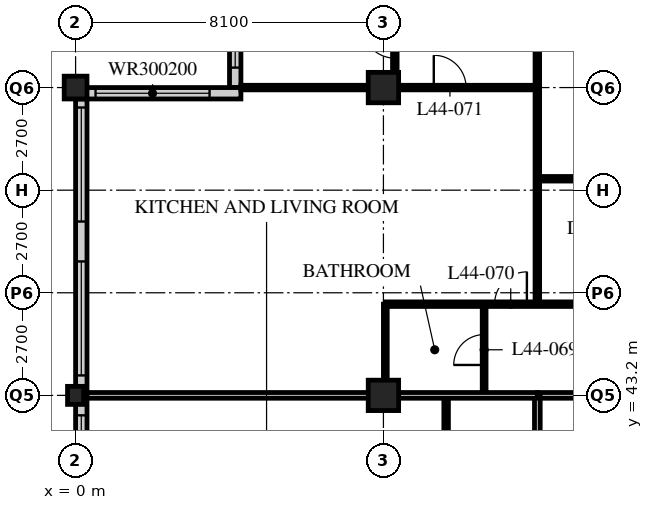
"""IFC4 building model, lengths in metres.
Left out: names, types, materials, properties, quantities, classifications, styles, units other than length and angle.
Written with IfcOpenShell. Run it as: python <this file> out.ifc"""

import sys

from ifc_helpers import new_model, si_unit, direction, frame, frame_2d, origin, origin_2d, place, context, subcontext, project, spatial, rectangle, hollow_rectangle, i_section, extrude, element, fill, save


model = new_model("IFC4")
c1 = context("Model", 3, precision=1e-05, world=origin(), true_north=direction((0.0, 1.0)))
c2 = subcontext(c1, "Body", "Model", "MODEL_VIEW")
j1 = project(units=[si_unit("LENGTHUNIT", "METRE"), si_unit("PLANEANGLEUNIT", "RADIAN")], contexts=[c1])
p1 = place(None, origin())
s1 = spatial("IfcSite", under=j1, at=p1, CompositionType="ELEMENT")
p2 = place(p1, origin())
s2 = spatial("IfcBuilding", under=s1, at=p2, CompositionType="ELEMENT")
p3 = place(p2, frame((0.0, 0.0, 174.0)))
s3 = spatial("IfcBuildingStorey", under=s2, at=p3, CompositionType="ELEMENT", Elevation=174.0)
p4 = place(p3, frame((0.0, 43.2, 0.0), z_axis=(0.0, 0.0, 1.0), x_axis=(1.0, 0.0, 0.0)))
e1 = element("IfcColumn", 1, at=p4, inside=s3, PredefinedType="COLUMN", context=c2, shape_type="SweptSolid", body=[
    extrude(i_section(OverallWidth=0.424, OverallDepth=0.475, WebThickness=0.048, FlangeThickness=0.077, FilletRadius=0.015, at=origin_2d()), origin(), (0.0, 0.0, 1.0), 3.6),
])
p5 = place(p3, frame((0.0, 51.3, 0.0), z_axis=(0.0, 0.0, 1.0), x_axis=(1.0, 0.0, 0.0)))
e2 = element("IfcColumn", 2, at=p5, inside=s3, PredefinedType="COLUMN", context=c2, shape_type="SweptSolid", body=[
    extrude(hollow_rectangle(XDim=0.6, YDim=0.6, WallThickness=0.05, at=origin_2d()), origin(), (0.0, 0.0, 1.0), 3.6),
])
for number, where, z_axis, x_axis in (
    (3, (8.1, 43.2, 0.0), (0.0, 0.0, 1.0), (1.0, 0.0, 0.0)),
    (4, (8.1, 51.3, 0.0), (0.0, 0.0, 1.0), (1.0, 0.0, 0.0)),
):
    element("IfcColumn", number, at=place(p3, frame(where, z_axis=z_axis, x_axis=x_axis)), inside=s3, PredefinedType="COLUMN", context=c2, shape_type="SweptSolid", body=[
        extrude(hollow_rectangle(XDim=0.8, YDim=0.8, WallThickness=0.08, at=origin_2d()), origin(), (0.0, 0.0, 1.0), 3.6),
    ])
p6 = place(p3, frame((4.2, 55.05, 0.0), z_axis=(0.0, 0.0, 1.0), x_axis=(0.0, -1.0, 0.0)))
e5 = element("IfcWall", 5, at=p6, inside=s3, PredefinedType="SOLIDWALL", context=c2, shape_type="SweptSolid", body=[
    extrude(rectangle(XDim=3.75, YDim=0.3, at=frame_2d((1.875, 0.0))), origin(), (0.0, 0.0, 1.0), 3.39),
])
p7 = place(p6, frame((0.225, 0.0, 0.6)))
e6 = element("IfcOpeningElement", 6, at=p7, cuts=e5, PredefinedType="OPENING", context=c2, shape_type="SweptSolid", body=[
    extrude(rectangle(XDim=3.0, YDim=2.0, at=frame_2d((1.5, 1.0))), frame((0.0, 0.16, 0.0), z_axis=(0.0, -1.0, 0.0), x_axis=(1.0, 0.0, 0.0)), (0.0, 0.0, 1.0), 0.32),
])
p8 = place(p3, frame((4.35, 51.15, 0.0), z_axis=(0.0, 0.0, 1.0), x_axis=(-1.0, 0.0, 0.0)))
e7 = element("IfcWall", 7, at=p8, inside=s3, PredefinedType="SOLIDWALL", context=c2, shape_type="SweptSolid", body=[
    extrude(rectangle(XDim=4.35, YDim=0.3, at=frame_2d((2.175, 0.0))), origin(), (0.0, 0.0, 1.0), 3.39),
])
p9 = place(p8, frame((0.825, 0.0, 0.6)))
e8 = element("IfcOpeningElement", 8, at=p9, cuts=e7, PredefinedType="OPENING", context=c2, shape_type="SweptSolid", body=[
    extrude(rectangle(XDim=3.0, YDim=2.0, at=frame_2d((1.5, 1.0))), frame((0.0, 0.16, 0.0), z_axis=(0.0, -1.0, 0.0), x_axis=(1.0, 0.0, 0.0)), (0.0, 0.0, 1.0), 0.32),
])
p10 = place(p3, frame((0.15, 51.0, 0.0), z_axis=(0.0, 0.0, 1.0), x_axis=(0.0, -1.0, 0.0)))
e9 = element("IfcWall", 9, at=p10, inside=s3, PredefinedType="SOLIDWALL", context=c2, shape_type="SweptSolid", body=[
    extrude(rectangle(XDim=32.1, YDim=0.3, at=frame_2d((16.05, 0.0))), origin(), (0.0, 0.0, 1.0), 3.39),
])
p11 = place(p10, frame((0.225, 0.0, 0.6)))
e10 = element("IfcOpeningElement", 10, at=p11, cuts=e9, PredefinedType="OPENING", context=c2, shape_type="SweptSolid", body=[
    extrude(rectangle(XDim=3.0, YDim=2.4, at=frame_2d((1.5, 1.2))), frame((0.0, 0.16, 0.0), z_axis=(0.0, -1.0, 0.0), x_axis=(1.0, 0.0, 0.0)), (0.0, 0.0, 1.0), 0.32),
])
p12 = place(p10, frame((4.275, 0.0, 0.6)))
e11 = element("IfcOpeningElement", 11, at=p12, cuts=e9, PredefinedType="OPENING", context=c2, shape_type="SweptSolid", body=[
    extrude(rectangle(XDim=3.0, YDim=2.4, at=frame_2d((1.5, 1.2))), frame((0.0, 0.16, 0.0), z_axis=(0.0, -1.0, 0.0), x_axis=(1.0, 0.0, 0.0)), (0.0, 0.0, 1.0), 0.32),
])
p13 = place(p10, frame((8.325, 0.0, 0.6)))
e12 = element("IfcOpeningElement", 12, at=p13, cuts=e9, PredefinedType="OPENING", context=c2, shape_type="SweptSolid", body=[
    extrude(rectangle(XDim=3.0, YDim=2.4, at=frame_2d((1.5, 1.2))), frame((0.0, 0.16, 0.0), z_axis=(0.0, -1.0, 0.0), x_axis=(1.0, 0.0, 0.0)), (0.0, 0.0, 1.0), 0.32),
])
p14 = place(p10, frame((12.375, 0.0, 0.6)))
e13 = element("IfcOpeningElement", 13, at=p14, cuts=e9, PredefinedType="OPENING", context=c2, shape_type="SweptSolid", body=[
    extrude(rectangle(XDim=3.0, YDim=2.4, at=frame_2d((1.5, 1.2))), frame((0.0, 0.16, 0.0), z_axis=(0.0, -1.0, 0.0), x_axis=(1.0, 0.0, 0.0)), (0.0, 0.0, 1.0), 0.32),
])
p15 = place(p10, frame((16.425, 0.0, 0.6)))
e14 = element("IfcOpeningElement", 14, at=p15, cuts=e9, PredefinedType="OPENING", context=c2, shape_type="SweptSolid", body=[
    extrude(rectangle(XDim=3.0, YDim=2.4, at=frame_2d((1.5, 1.2))), frame((0.0, 0.16, 0.0), z_axis=(0.0, -1.0, 0.0), x_axis=(1.0, 0.0, 0.0)), (0.0, 0.0, 1.0), 0.32),
])
p16 = place(p10, frame((20.475, 0.0, 0.6)))
e15 = element("IfcOpeningElement", 15, at=p16, cuts=e9, PredefinedType="OPENING", context=c2, shape_type="SweptSolid", body=[
    extrude(rectangle(XDim=3.0, YDim=2.4, at=frame_2d((1.5, 1.2))), frame((0.0, 0.16, 0.0), z_axis=(0.0, -1.0, 0.0), x_axis=(1.0, 0.0, 0.0)), (0.0, 0.0, 1.0), 0.32),
])
p17 = place(p10, frame((24.525, 0.0, 0.6)))
e16 = element("IfcOpeningElement", 16, at=p17, cuts=e9, PredefinedType="OPENING", context=c2, shape_type="SweptSolid", body=[
    extrude(rectangle(XDim=3.0, YDim=2.4, at=frame_2d((1.5, 1.2))), frame((0.0, 0.16, 0.0), z_axis=(0.0, -1.0, 0.0), x_axis=(1.0, 0.0, 0.0)), (0.0, 0.0, 1.0), 0.32),
])
p18 = place(p10, frame((28.575, 0.0, 0.6)))
e17 = element("IfcOpeningElement", 17, at=p18, cuts=e9, PredefinedType="OPENING", context=c2, shape_type="SweptSolid", body=[
    extrude(rectangle(XDim=3.0, YDim=2.4, at=frame_2d((1.5, 1.2))), frame((0.0, 0.16, 0.0), z_axis=(0.0, -1.0, 0.0), x_axis=(1.0, 0.0, 0.0)), (0.0, 0.0, 1.0), 0.32),
])
p19 = place(p3, frame((12.15, 43.2, 0.0), z_axis=(0.0, 0.0, 1.0), x_axis=(1.0, 0.0, 0.0)))
e18 = element("IfcWall", 18, at=p19, inside=s3, PredefinedType="PARTITIONING", context=c2, shape_type="SweptSolid", body=[
    extrude(rectangle(XDim=32.4, YDim=0.15, at=frame_2d((16.2, 0.0))), origin(), (0.0, 0.0, 1.0), 2.778),
])
p20 = place(p19, frame((4.95, 0.0, 0.0)))
e19 = element("IfcOpeningElement", 19, at=p20, cuts=e18, PredefinedType="OPENING", context=c2, shape_type="SweptSolid", body=[
    extrude(rectangle(XDim=1.0, YDim=2.1, at=frame_2d((0.5, 1.05))), frame((0.0, 0.085, 0.0), z_axis=(0.0, -1.0, 0.0), x_axis=(1.0, 0.0, 0.0)), (0.0, 0.0, 1.0), 0.17),
])
p21 = place(p19, frame((13.05, 0.0, 0.0)))
e20 = element("IfcOpeningElement", 20, at=p21, cuts=e18, PredefinedType="OPENING", context=c2, shape_type="SweptSolid", body=[
    extrude(rectangle(XDim=1.0, YDim=2.1, at=frame_2d((0.5, 1.05))), frame((0.0, 0.085, 0.0), z_axis=(0.0, -1.0, 0.0), x_axis=(1.0, 0.0, 0.0)), (0.0, 0.0, 1.0), 0.17),
])
p22 = place(p19, frame((21.15, 0.0, 0.0)))
e21 = element("IfcOpeningElement", 21, at=p22, cuts=e18, PredefinedType="OPENING", context=c2, shape_type="SweptSolid", body=[
    extrude(rectangle(XDim=1.0, YDim=2.1, at=frame_2d((0.5, 1.05))), frame((0.0, 0.085, 0.0), z_axis=(0.0, -1.0, 0.0), x_axis=(1.0, 0.0, 0.0)), (0.0, 0.0, 1.0), 0.17),
])
p23 = place(p19, frame((29.875, 0.0, 0.0)))
e22 = element("IfcOpeningElement", 22, at=p23, cuts=e18, PredefinedType="OPENING", context=c2, shape_type="SweptSolid", body=[
    extrude(rectangle(XDim=1.0, YDim=2.1, at=frame_2d((0.5, 1.05))), frame((0.0, 0.085, 0.0), z_axis=(0.0, -1.0, 0.0), x_axis=(1.0, 0.0, 0.0)), (0.0, 0.0, 1.0), 0.17),
])
p24 = place(p19, frame((1.525, 0.0, 0.0)))
e23 = element("IfcOpeningElement", 23, at=p24, cuts=e18, PredefinedType="OPENING", context=c2, shape_type="SweptSolid", body=[
    extrude(rectangle(XDim=1.0, YDim=2.1, at=frame_2d((0.5, 1.05))), frame((0.0, 0.085, 0.0), z_axis=(0.0, -1.0, 0.0), x_axis=(1.0, 0.0, 0.0)), (0.0, 0.0, 1.0), 0.17),
])
p25 = place(p3, frame((12.15, 18.9, 0.0), z_axis=(0.0, 0.0, 1.0), x_axis=(0.0, 1.0, 0.0)))
e24 = element("IfcWall", 24, at=p25, inside=s3, PredefinedType="PARTITIONING", context=c2, shape_type="SweptSolid", body=[
    extrude(rectangle(XDim=24.3, YDim=0.15, at=frame_2d((12.15, 0.0))), origin(), (0.0, 0.0, 1.0), 3.39),
])
p26 = place(p25, frame((2.35, 0.0, 0.0)))
e25 = element("IfcOpeningElement", 25, at=p26, cuts=e24, PredefinedType="OPENING", context=c2, shape_type="SweptSolid", body=[
    extrude(rectangle(XDim=1.0, YDim=2.1, at=frame_2d((0.5, 1.05))), frame((0.0, 0.085, 0.0), z_axis=(0.0, -1.0, 0.0), x_axis=(1.0, 0.0, 0.0)), (0.0, 0.0, 1.0), 0.17),
])
p27 = place(p25, frame((6.4, 0.0, 0.0)))
e26 = element("IfcOpeningElement", 26, at=p27, cuts=e24, PredefinedType="OPENING", context=c2, shape_type="SweptSolid", body=[
    extrude(rectangle(XDim=1.0, YDim=2.1, at=frame_2d((0.5, 1.05))), frame((0.0, 0.085, 0.0), z_axis=(0.0, -1.0, 0.0), x_axis=(1.0, 0.0, 0.0)), (0.0, 0.0, 1.0), 0.17),
])
p28 = place(p25, frame((8.5, 0.0, 0.0)))
e27 = element("IfcOpeningElement", 27, at=p28, cuts=e24, PredefinedType="OPENING", context=c2, shape_type="SweptSolid", body=[
    extrude(rectangle(XDim=1.0, YDim=2.1, at=frame_2d((0.5, 1.05))), frame((0.0, 0.085, 0.0), z_axis=(0.0, -1.0, 0.0), x_axis=(1.0, 0.0, 0.0)), (0.0, 0.0, 1.0), 0.17),
])
p29 = place(p25, frame((16.6, 0.0, 0.0)))
e28 = element("IfcOpeningElement", 28, at=p29, cuts=e24, PredefinedType="OPENING", context=c2, shape_type="SweptSolid", body=[
    extrude(rectangle(XDim=1.0, YDim=2.1, at=frame_2d((0.5, 1.05))), frame((0.0, 0.085, 0.0), z_axis=(0.0, -1.0, 0.0), x_axis=(1.0, 0.0, 0.0)), (0.0, 0.0, 1.0), 0.17),
])
p30 = place(p3, frame((9.75, 27.0, 0.0), z_axis=(0.0, 0.0, 1.0), x_axis=(0.0, 1.0, 0.0)))
e29 = element("IfcWall", 29, at=p30, inside=s3, PredefinedType="PARTITIONING", context=c2, shape_type="SweptSolid", body=[
    extrude(rectangle(XDim=16.2, YDim=0.12, at=frame_2d((8.1, 0.0))), origin(), (0.0, 0.0, 1.0), 3.39),
])
p31 = place(p30, frame((0.975, 0.0, 0.0)))
e30 = element("IfcOpeningElement", 30, at=p31, cuts=e29, PredefinedType="OPENING", context=c2, shape_type="SweptSolid", body=[
    extrude(rectangle(XDim=0.85, YDim=2.1, at=frame_2d((0.425, 1.05))), frame((0.0, 0.07, 0.0), z_axis=(0.0, -1.0, 0.0), x_axis=(1.0, 0.0, 0.0)), (0.0, 0.0, 1.0), 0.14),
])
p32 = place(p30, frame((4.375, 0.0, 0.0)))
e31 = element("IfcOpeningElement", 31, at=p32, cuts=e29, PredefinedType="OPENING", context=c2, shape_type="SweptSolid", body=[
    extrude(rectangle(XDim=0.85, YDim=2.1, at=frame_2d((0.425, 1.05))), frame((0.0, 0.07, 0.0), z_axis=(0.0, -1.0, 0.0), x_axis=(1.0, 0.0, 0.0)), (0.0, 0.0, 1.0), 0.14),
])
p33 = place(p30, frame((9.075, 0.0, 0.0)))
e32 = element("IfcOpeningElement", 32, at=p33, cuts=e29, PredefinedType="OPENING", context=c2, shape_type="SweptSolid", body=[
    extrude(rectangle(XDim=0.85, YDim=2.1, at=frame_2d((0.425, 1.05))), frame((0.0, 0.07, 0.0), z_axis=(0.0, -1.0, 0.0), x_axis=(1.0, 0.0, 0.0)), (0.0, 0.0, 1.0), 0.14),
])
p34 = place(p30, frame((12.475, 0.0, 0.0)))
e33 = element("IfcOpeningElement", 33, at=p34, cuts=e29, PredefinedType="OPENING", context=c2, shape_type="SweptSolid", body=[
    extrude(rectangle(XDim=0.85, YDim=2.1, at=frame_2d((0.425, 1.05))), frame((0.0, 0.07, 0.0), z_axis=(0.0, -1.0, 0.0), x_axis=(1.0, 0.0, 0.0)), (0.0, 0.0, 1.0), 0.14),
])
p35 = place(p3, frame((10.75, 43.2, 0.0), z_axis=(0.0, 0.0, 1.0), x_axis=(0.0, 1.0, 0.0)))
e34 = element("IfcWall", 34, at=p35, inside=s3, PredefinedType="PARTITIONING", context=c2, shape_type="SweptSolid", body=[
    extrude(rectangle(XDim=2.4, YDim=0.1, at=frame_2d((1.2, 0.0))), origin(), (0.0, 0.0, 1.0), 3.39),
])
p36 = place(p35, frame((0.8, 0.0, 0.0)))
e35 = element("IfcOpeningElement", 35, at=p36, cuts=e34, PredefinedType="OPENING", context=c2, shape_type="SweptSolid", body=[
    extrude(rectangle(XDim=0.8, YDim=2.1, at=frame_2d((0.4, 1.05))), frame((0.0, 0.06, 0.0), z_axis=(0.0, -1.0, 0.0), x_axis=(1.0, 0.0, 0.0)), (0.0, 0.0, 1.0), 0.12),
])
p37 = place(p3, frame((8.15, 43.2, 0.0), z_axis=(0.0, 0.0, 1.0), x_axis=(0.0, 1.0, 0.0)))
e36 = element("IfcWall", 36, at=p37, inside=s3, PredefinedType="PARTITIONING", context=c2, shape_type="SweptSolid", body=[
    extrude(rectangle(XDim=2.4, YDim=0.1, at=frame_2d((1.2, 0.0))), origin(), (0.0, 0.0, 1.0), 2.778),
])
p38 = place(p3, frame((8.15, 45.6, 0.0), z_axis=(0.0, 0.0, 1.0), x_axis=(1.0, 0.0, 0.0)))
e37 = element("IfcWall", 37, at=p38, inside=s3, PredefinedType="PARTITIONING", context=c2, shape_type="SweptSolid", body=[
    extrude(rectangle(XDim=40.4, YDim=0.12, at=frame_2d((20.2, 0.0))), origin(), (0.0, 0.0, 1.0), 3.39),
])
p39 = place(p38, frame((9.025, 0.0, 0.0)))
e38 = element("IfcOpeningElement", 38, at=p39, cuts=e37, PredefinedType="OPENING", context=c2, shape_type="SweptSolid", body=[
    extrude(rectangle(XDim=0.85, YDim=2.1, at=frame_2d((0.425, 1.05))), frame((0.0, 0.07, 0.0), z_axis=(0.0, -1.0, 0.0), x_axis=(1.0, 0.0, 0.0)), (0.0, 0.0, 1.0), 0.14),
])
p40 = place(p38, frame((12.425, 0.0, 0.0)))
e39 = element("IfcOpeningElement", 39, at=p40, cuts=e37, PredefinedType="OPENING", context=c2, shape_type="SweptSolid", body=[
    extrude(rectangle(XDim=0.85, YDim=2.1, at=frame_2d((0.425, 1.05))), frame((0.0, 0.07, 0.0), z_axis=(0.0, -1.0, 0.0), x_axis=(1.0, 0.0, 0.0)), (0.0, 0.0, 1.0), 0.14),
])
p41 = place(p38, frame((17.125, 0.0, 0.0)))
e40 = element("IfcOpeningElement", 40, at=p41, cuts=e37, PredefinedType="OPENING", context=c2, shape_type="SweptSolid", body=[
    extrude(rectangle(XDim=0.85, YDim=2.1, at=frame_2d((0.425, 1.05))), frame((0.0, 0.07, 0.0), z_axis=(0.0, -1.0, 0.0), x_axis=(1.0, 0.0, 0.0)), (0.0, 0.0, 1.0), 0.14),
])
p42 = place(p38, frame((20.525, 0.0, 0.0)))
e41 = element("IfcOpeningElement", 41, at=p42, cuts=e37, PredefinedType="OPENING", context=c2, shape_type="SweptSolid", body=[
    extrude(rectangle(XDim=0.85, YDim=2.1, at=frame_2d((0.425, 1.05))), frame((0.0, 0.07, 0.0), z_axis=(0.0, -1.0, 0.0), x_axis=(1.0, 0.0, 0.0)), (0.0, 0.0, 1.0), 0.14),
])
p43 = place(p38, frame((25.225, 0.0, 0.0)))
e42 = element("IfcOpeningElement", 42, at=p43, cuts=e37, PredefinedType="OPENING", context=c2, shape_type="SweptSolid", body=[
    extrude(rectangle(XDim=0.85, YDim=2.1, at=frame_2d((0.425, 1.05))), frame((0.0, 0.07, 0.0), z_axis=(0.0, -1.0, 0.0), x_axis=(1.0, 0.0, 0.0)), (0.0, 0.0, 1.0), 0.14),
])
p44 = place(p38, frame((28.625, 0.0, 0.0)))
e43 = element("IfcOpeningElement", 43, at=p44, cuts=e37, PredefinedType="OPENING", context=c2, shape_type="SweptSolid", body=[
    extrude(rectangle(XDim=0.85, YDim=2.1, at=frame_2d((0.425, 1.05))), frame((0.0, 0.07, 0.0), z_axis=(0.0, -1.0, 0.0), x_axis=(1.0, 0.0, 0.0)), (0.0, 0.0, 1.0), 0.14),
])
p45 = place(p38, frame((32.825, 0.0, 0.0)))
e44 = element("IfcOpeningElement", 44, at=p45, cuts=e37, PredefinedType="OPENING", context=c2, shape_type="SweptSolid", body=[
    extrude(rectangle(XDim=0.85, YDim=2.1, at=frame_2d((0.425, 1.05))), frame((0.0, 0.07, 0.0), z_axis=(0.0, -1.0, 0.0), x_axis=(1.0, 0.0, 0.0)), (0.0, 0.0, 1.0), 0.14),
])
p46 = place(p38, frame((36.675, 0.0, 0.0)))
e45 = element("IfcOpeningElement", 45, at=p46, cuts=e37, PredefinedType="OPENING", context=c2, shape_type="SweptSolid", body=[
    extrude(rectangle(XDim=0.85, YDim=2.1, at=frame_2d((0.425, 1.05))), frame((0.0, 0.07, 0.0), z_axis=(0.0, -1.0, 0.0), x_axis=(1.0, 0.0, 0.0)), (0.0, 0.0, 1.0), 0.14),
])
p47 = place(p38, frame((6.725, 0.0, 0.0)))
e46 = element("IfcOpeningElement", 46, at=p47, cuts=e37, PredefinedType="OPENING", context=c2, shape_type="SweptSolid", body=[
    extrude(rectangle(XDim=0.85, YDim=2.1, at=frame_2d((0.425, 1.05))), frame((0.0, 0.07, 0.0), z_axis=(0.0, -1.0, 0.0), x_axis=(1.0, 0.0, 0.0)), (0.0, 0.0, 1.0), 0.14),
])
p48 = place(p38, frame((2.875, 0.0, 0.0)))
e47 = element("IfcOpeningElement", 47, at=p48, cuts=e37, PredefinedType="OPENING", context=c2, shape_type="SweptSolid", body=[
    extrude(rectangle(XDim=0.85, YDim=2.1, at=frame_2d((0.425, 1.05))), frame((0.0, 0.07, 0.0), z_axis=(0.0, -1.0, 0.0), x_axis=(1.0, 0.0, 0.0)), (0.0, 0.0, 1.0), 0.14),
])
p49 = place(p3, frame((12.15, 45.6, 0.0), z_axis=(0.0, 0.0, 1.0), x_axis=(0.0, 1.0, 0.0)))
e48 = element("IfcWall", 48, at=p49, inside=s3, PredefinedType="PARTITIONING", context=c2, shape_type="SweptSolid", body=[
    extrude(rectangle(XDim=13.5, YDim=0.12, at=frame_2d((6.75, 0.0))), origin(), (0.0, 0.0, 1.0), 3.39),
])
p50 = place(p3, frame((12.15, 51.3, 0.0), z_axis=(0.0, 0.0, 1.0), x_axis=(-1.0, 0.0, 0.0)))
e49 = element("IfcWall", 49, at=p50, inside=s3, PredefinedType="PARTITIONING", context=c2, shape_type="SweptSolid", body=[
    extrude(rectangle(XDim=7.8, YDim=0.12, at=frame_2d((3.9, 0.0))), origin(), (0.0, 0.0, 1.0), 2.778),
])
p51 = place(p50, frame((1.875, 0.0, 0.0)))
e50 = element("IfcOpeningElement", 50, at=p51, cuts=e49, PredefinedType="OPENING", context=c2, shape_type="SweptSolid", body=[
    extrude(rectangle(XDim=0.85, YDim=2.1, at=frame_2d((0.425, 1.05))), frame((0.0, 0.07, 0.0), z_axis=(0.0, -1.0, 0.0), x_axis=(1.0, 0.0, 0.0)), (0.0, 0.0, 1.0), 0.14),
])
p52 = place(p3, frame((0.3, 43.2, 0.0), z_axis=(0.0, 0.0, 1.0), x_axis=(1.0, 0.0, 0.0)))
e51 = element("IfcWall", 51, at=p52, inside=s3, PredefinedType="PARTITIONING", context=c2, shape_type="SweptSolid", body=[
    extrude(rectangle(XDim=11.85, YDim=0.15, at=frame_2d((5.925, 0.0))), origin(), (0.0, 0.0, 1.0), 2.778),
])
p53 = place(p3, frame((8.4, 55.06, 0.0), z_axis=(0.0, 0.0, 1.0), x_axis=(0.0, -1.0, 0.0)))
e52 = element("IfcWall", 52, at=p53, inside=s3, PredefinedType="PARTITIONING", context=c2, shape_type="SweptSolid", body=[
    extrude(rectangle(XDim=3.76, YDim=0.12, at=frame_2d((1.88, 0.0))), origin(), (0.0, 0.0, 1.0), 3.39),
])
p54 = place(p53, frame((2.135, 0.0, 0.0)))
e53 = element("IfcOpeningElement", 53, at=p54, cuts=e52, PredefinedType="OPENING", context=c2, shape_type="SweptSolid", body=[
    extrude(rectangle(XDim=0.85, YDim=2.1, at=frame_2d((0.425, 1.05))), frame((0.0, 0.07, 0.0), z_axis=(0.0, -1.0, 0.0), x_axis=(1.0, 0.0, 0.0)), (0.0, 0.0, 1.0), 0.14),
])
p55 = place(p3, frame((12.15, 48.9, 0.0), z_axis=(0.0, 0.0, 1.0), x_axis=(1.0, 0.0, 0.0)))
e54 = element("IfcWall", 54, at=p55, inside=s3, PredefinedType="PARTITIONING", context=c2, shape_type="SweptSolid", body=[
    extrude(rectangle(XDim=4.05, YDim=0.12, at=frame_2d((2.025, 0.0))), origin(), (0.0, 0.0, 1.0), 3.39),
])
p56 = place(p55, frame((1.6, 0.0, 0.0)))
e55 = element("IfcOpeningElement", 55, at=p56, cuts=e54, PredefinedType="OPENING", context=c2, shape_type="SweptSolid", body=[
    extrude(rectangle(XDim=0.85, YDim=2.1, at=frame_2d((0.425, 1.05))), frame((0.0, 0.07, 0.0), z_axis=(0.0, -1.0, 0.0), x_axis=(1.0, 0.0, 0.0)), (0.0, 0.0, 1.0), 0.14),
])
p57 = place(p7, origin())
e56 = element("IfcWindow", 56, at=p57, inside=s3, PartitioningType="SINGLE_PANEL", PredefinedType="WINDOW", context=c2, shape_type="SweptSolid", body=[
    extrude(rectangle(XDim=3.0, YDim=2.0, at=frame_2d((1.5, 1.0))), frame((0.0, 0.03, 0.0), z_axis=(0.0, -1.0, 0.0), x_axis=(1.0, 0.0, 0.0)), (0.0, 0.0, 1.0), 0.06),
])
fill(e6, e56)
p58 = place(p9, origin())
e57 = element("IfcWindow", 57, at=p58, inside=s3, PartitioningType="SINGLE_PANEL", PredefinedType="WINDOW", context=c2, shape_type="SweptSolid", body=[
    extrude(rectangle(XDim=3.0, YDim=2.0, at=frame_2d((1.5, 1.0))), frame((0.0, 0.03, 0.0), z_axis=(0.0, -1.0, 0.0), x_axis=(1.0, 0.0, 0.0)), (0.0, 0.0, 1.0), 0.06),
])
fill(e8, e57)
p59 = place(p11, origin())
e58 = element("IfcWindow", 58, at=p59, inside=s3, PartitioningType="SINGLE_PANEL", PredefinedType="WINDOW", context=c2, shape_type="SweptSolid", body=[
    extrude(rectangle(XDim=3.0, YDim=2.4, at=frame_2d((1.5, 1.2))), frame((0.0, 0.03, 0.0), z_axis=(0.0, -1.0, 0.0), x_axis=(1.0, 0.0, 0.0)), (0.0, 0.0, 1.0), 0.06),
])
fill(e10, e58)
p60 = place(p12, origin())
e59 = element("IfcWindow", 59, at=p60, inside=s3, PartitioningType="SINGLE_PANEL", PredefinedType="WINDOW", context=c2, shape_type="SweptSolid", body=[
    extrude(rectangle(XDim=3.0, YDim=2.4, at=frame_2d((1.5, 1.2))), frame((0.0, 0.03, 0.0), z_axis=(0.0, -1.0, 0.0), x_axis=(1.0, 0.0, 0.0)), (0.0, 0.0, 1.0), 0.06),
])
fill(e11, e59)
p61 = place(p13, origin())
e60 = element("IfcWindow", 60, at=p61, inside=s3, PartitioningType="SINGLE_PANEL", PredefinedType="WINDOW", context=c2, shape_type="SweptSolid", body=[
    extrude(rectangle(XDim=3.0, YDim=2.4, at=frame_2d((1.5, 1.2))), frame((0.0, 0.03, 0.0), z_axis=(0.0, -1.0, 0.0), x_axis=(1.0, 0.0, 0.0)), (0.0, 0.0, 1.0), 0.06),
])
fill(e12, e60)
p62 = place(p36, origin())
e61 = element("IfcDoor", 61, at=p62, inside=s3, OperationType="SINGLE_SWING_LEFT", PredefinedType="DOOR", context=c2, shape_type="SweptSolid", body=[
    extrude(rectangle(XDim=0.8, YDim=2.1, at=frame_2d((0.4, 1.05))), frame((0.0, 0.025, 0.0), z_axis=(0.0, -1.0, 0.0), x_axis=(1.0, 0.0, 0.0)), (0.0, 0.0, 1.0), 0.05),
])
fill(e35, e61)
p63 = place(p48, origin())
e62 = element("IfcDoor", 62, at=p63, inside=s3, OperationType="SINGLE_SWING_RIGHT", PredefinedType="DOOR", context=c2, shape_type="SweptSolid", body=[
    extrude(rectangle(XDim=0.85, YDim=2.1, at=frame_2d((0.425, 1.05))), frame((0.0, 0.025, 0.0), z_axis=(0.0, -1.0, 0.0), x_axis=(1.0, 0.0, 0.0)), (0.0, 0.0, 1.0), 0.05),
])
fill(e47, e62)
p64 = place(p51, origin())
e63 = element("IfcDoor", 63, at=p64, inside=s3, OperationType="SINGLE_SWING_LEFT", PredefinedType="DOOR", context=c2, shape_type="SweptSolid", body=[
    extrude(rectangle(XDim=0.85, YDim=2.1, at=frame_2d((0.425, 1.05))), frame((0.0, 0.025, 0.0), z_axis=(0.0, -1.0, 0.0), x_axis=(1.0, 0.0, 0.0)), (0.0, 0.0, 1.0), 0.05),
])
fill(e50, e63)
p65 = place(p54, origin())
e64 = element("IfcDoor", 64, at=p65, inside=s3, OperationType="SINGLE_SWING_RIGHT", PredefinedType="DOOR", context=c2, shape_type="SweptSolid", body=[
    extrude(rectangle(XDim=0.85, YDim=2.1, at=frame_2d((0.425, 1.05))), frame((0.0, 0.025, 0.0), z_axis=(0.0, -1.0, 0.0), x_axis=(1.0, 0.0, 0.0)), (0.0, 0.0, 1.0), 0.05),
])
fill(e53, e64)
save(model, sys.argv[1])
